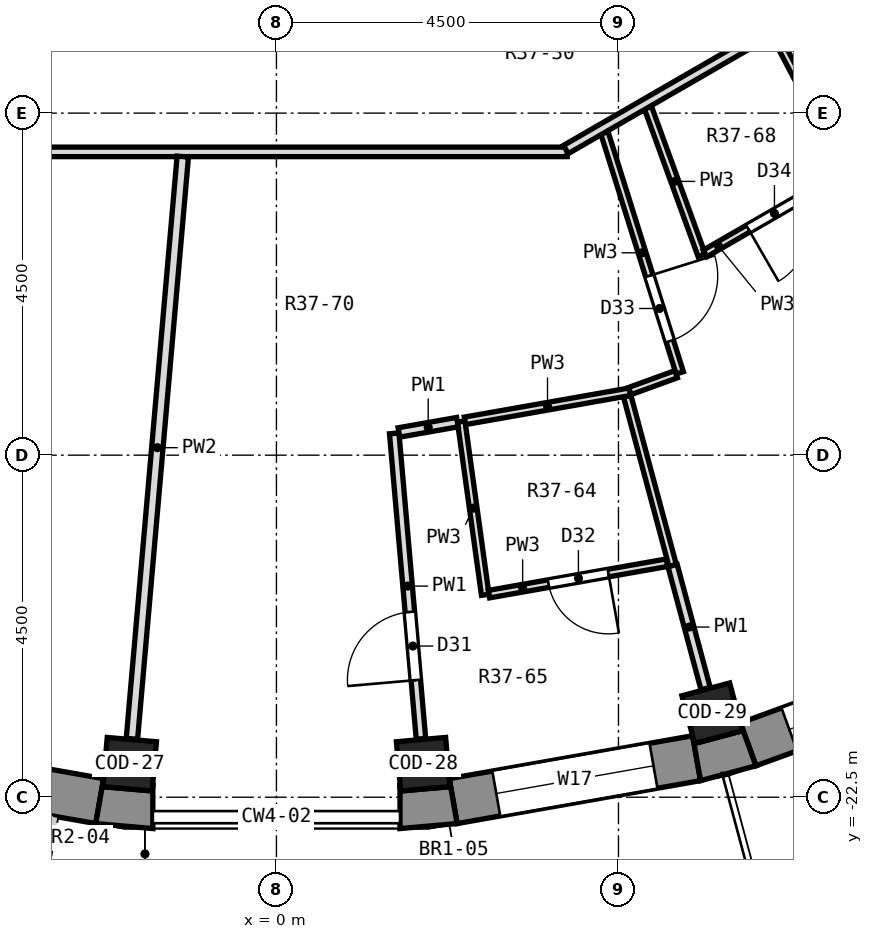
"""IFC4 building model, lengths in metres.
Left out: names, types, materials, properties, quantities, classifications, styles, units other than length and angle.
Written with IfcOpenShell. Run it as: python <this file> out.ifc"""

import sys

from ifc_helpers import new_model, si_unit, direction, frame, frame_2d, origin, origin_2d, place, context, subcontext, project, spatial, polyline, rectangle, outline, extrude, element, fill, save


model = new_model("IFC4")
c1 = context("Model", 3, precision=1e-05, world=origin(), true_north=direction((0.0, 1.0)))
c2 = subcontext(c1, "Body", "Model", "MODEL_VIEW")
j1 = project(units=[si_unit("LENGTHUNIT", "METRE"), si_unit("PLANEANGLEUNIT", "RADIAN")], contexts=[c1])
p1 = place(None, origin())
s1 = spatial("IfcSite", under=j1, at=p1, CompositionType="ELEMENT")
p2 = place(p1, origin())
s2 = spatial("IfcBuilding", under=s1, at=p2, CompositionType="ELEMENT")
p3 = place(p2, frame((0.0, 0.0, 269.3)))
s3 = spatial("IfcBuildingStorey", under=s2, at=p3, CompositionType="ELEMENT", Elevation=269.3)
for number, where, z_axis, x_axis in (
    (1, (-1.93, -22.066, 0.0), (0.0, 0.0, 1.0), (-0.087, -0.996, 0.0)),
    (2, (1.93, -22.066, 0.0), (0.0, 0.0, 1.0), (0.087, -0.996, 0.0)),
    (3, (5.733, -21.395, 0.0), (0.0, 0.0, 1.0), (0.259, -0.966, 0.0)),
):
    element("IfcColumn", number, at=place(p3, frame(where, z_axis=z_axis, x_axis=x_axis)), inside=s3, PredefinedType="COLUMN", context=c2, shape_type="SweptSolid", body=[
        extrude(rectangle(XDim=0.65, YDim=0.65, at=origin_2d()), origin(), (0.0, 0.0, 1.0), 3.3),
    ])
p4 = place(p3, frame((-5.528, -21.987, 0.0), z_axis=(0.0, 0.0, 1.0), x_axis=(0.984806225186, -0.173656842178, 0.0)))
e4 = element("IfcWall", 4, at=p4, inside=s3, PredefinedType="SOLIDWALL", context=c2, shape_type="SweptSolid", body=[
    extrude(rectangle(XDim=3.252, YDim=0.6, at=frame_2d((1.626, 0.0))), origin(), (0.0, 0.0, 1.0), 2.9),
])
p5 = place(p4, frame((0.876, 0.0, 0.0)))
e5 = element("IfcOpeningElement", 5, at=p5, cuts=e4, PredefinedType="OPENING", context=c2, shape_type="SweptSolid", body=[
    extrude(rectangle(XDim=1.5, YDim=2.4, at=frame_2d((0.75, 1.2))), frame((0.0, 0.312, 0.0), z_axis=(0.0, -1.0, 0.0), x_axis=(1.0, 0.0, 0.0)), (0.0, 0.0, 1.0), 0.624),
])
p6 = place(p3, frame((2.325, -22.551, 0.0), z_axis=(0.0, 0.0, 1.0), x_axis=(0.984806225186, 0.173656842178, 0.0)))
e6 = element("IfcWall", 6, at=p6, inside=s3, PredefinedType="SOLIDWALL", context=c2, shape_type="SweptSolid", body=[
    extrude(rectangle(XDim=3.252, YDim=0.6, at=frame_2d((1.626, 0.0))), origin(), (0.0, 0.0, 1.0), 2.9),
])
p7 = place(p6, frame((0.576, 0.0, 0.9)))
e7 = element("IfcOpeningElement", 7, at=p7, cuts=e6, PredefinedType="OPENING", context=c2, shape_type="SweptSolid", body=[
    extrude(rectangle(XDim=2.1, YDim=1.8, at=frame_2d((1.05, 0.9))), frame((0.0, 0.312, 0.0), z_axis=(0.0, -1.0, 0.0), x_axis=(1.0, 0.0, 0.0)), (0.0, 0.0, 1.0), 0.624),
])
p8 = place(p3, frame((6.206, -21.805, 0.0), z_axis=(0.0, 0.0, 1.0), x_axis=(0.939679383794, 0.342056509473, 0.0)))
e8 = element("IfcWall", 8, at=p8, inside=s3, PredefinedType="SOLIDWALL", context=c2, shape_type="SweptSolid", body=[
    extrude(rectangle(XDim=3.252, YDim=0.6, at=frame_2d((1.626, 0.0))), origin(), (0.0, 0.0, 1.0), 2.9),
])
p9 = place(p8, frame((0.576, 0.0, 0.9)))
e9 = element("IfcOpeningElement", 9, at=p9, cuts=e8, PredefinedType="OPENING", context=c2, shape_type="SweptSolid", body=[
    extrude(rectangle(XDim=2.1, YDim=1.8, at=frame_2d((1.05, 0.9))), frame((0.0, 0.312, 0.0), z_axis=(0.0, -1.0, 0.0), x_axis=(1.0, 0.0, 0.0)), (0.0, 0.0, 1.0), 0.624),
])
p10 = place(p3, origin())
e10 = element("IfcWall", 10, at=p10, inside=s3, PredefinedType="SOLIDWALL", context=c2, shape_type="SweptSolid", body=[
    extrude(outline(polyline([(-2.378, -22.847), (-1.626, -22.913), (-1.626, -22.312), (-1.635, -22.418), (-2.283, -22.361), (-2.273, -22.256), (-2.378, -22.847)])), origin(), (0.0, 0.0, 1.0), 2.9),
])
p11 = place(p3, origin())
e11 = element("IfcWall", 11, at=p11, inside=s3, PredefinedType="SOLIDWALL", context=c2, shape_type="SweptSolid", body=[
    extrude(outline(polyline([(1.626, -22.913), (2.378, -22.847), (2.273, -22.256), (2.283, -22.361), (1.635, -22.418), (1.626, -22.312), (1.626, -22.913)])), origin(), (0.0, 0.0, 1.0), 2.9),
])
p12 = place(p3, origin())
e12 = element("IfcWall", 12, at=p12, inside=s3, PredefinedType="SOLIDWALL", context=c2, shape_type="SweptSolid", body=[
    extrude(outline(polyline([(6.309, -22.087), (6.104, -21.523), (6.131, -21.625), (5.503, -21.793), (5.476, -21.691), (5.58, -22.282), (6.309, -22.087)])), origin(), (0.0, 0.0, 1.0), 2.9),
])
p13 = place(p3, origin())
e13 = element("IfcWall", 13, at=p13, inside=s3, PredefinedType="PARAPET", context=c2, shape_type="SweptSolid", body=[
    extrude(outline(polyline([(-10.675, -22.892), (-6.537, -24.398), (-2.201, -25.163), (-2.149, -24.562), (-6.382, -23.816), (-10.42, -22.346), (-10.675, -22.892)])), origin(), (0.0, 0.0, 1.0), 0.5),
])
p14 = place(p3, frame((1.55, -17.713, 0.0), z_axis=(0.0, 0.0, 1.0), x_axis=(0.087206738893, -0.996190235192, 0.0)))
e14 = element("IfcWall", 14, at=p14, inside=s3, PredefinedType="PARTITIONING", context=c2, shape_type="SweptSolid", body=[
    extrude(rectangle(XDim=4.034, YDim=0.125, at=frame_2d((2.017, 0.0))), origin(), (0.0, 0.0, 1.0), 2.9),
])
p15 = place(p14, frame((2.359, 0.0, 0.0)))
e15 = element("IfcOpeningElement", 15, at=p15, cuts=e14, PredefinedType="OPENING", context=c2, shape_type="SweptSolid", body=[
    extrude(rectangle(XDim=0.9, YDim=2.1, at=frame_2d((0.45, 1.05))), frame((0.0, 0.074, 0.0), z_axis=(0.0, -1.0, 0.0), x_axis=(1.0, 0.0, 0.0)), (0.0, 0.0, 1.0), 0.149),
])
p16 = place(p3, frame((2.431, -17.557, 0.0), z_axis=(0.0, 0.0, 1.0), x_axis=(0.137351585164, -0.990522358179, 0.0)))
e16 = element("IfcWall", 16, at=p16, inside=s3, PredefinedType="PARTITIONING", context=c2, shape_type="SweptSolid", body=[
    extrude(rectangle(XDim=2.302, YDim=0.1, at=frame_2d((1.151, 0.0))), origin(), (0.0, 0.0, 1.0), 2.9),
])
p17 = place(p3, frame((4.615, -17.222, 0.0), z_axis=(0.0, 0.0, 1.0), x_axis=(0.259222412409, -0.965817654066, 0.0)))
e17 = element("IfcWall", 17, at=p17, inside=s3, PredefinedType="PARTITIONING", context=c2, shape_type="SweptSolid", body=[
    extrude(rectangle(XDim=2.308, YDim=0.1, at=frame_2d((1.154, 0.0))), origin(), (0.0, 0.0, 1.0), 2.9),
])
p18 = place(p3, frame((5.212, -19.452, 0.0), z_axis=(0.0, 0.0, 1.0), x_axis=(0.259221341364, -0.96581794153, 0.0)))
e18 = element("IfcWall", 18, at=p18, inside=s3, PredefinedType="PARTITIONING", context=c2, shape_type="SweptSolid", body=[
    extrude(rectangle(XDim=1.677, YDim=0.125, at=frame_2d((0.838, 0.0))), origin(), (0.0, 0.0, 1.0), 2.9),
])
p19 = place(p3, frame((4.315, -13.758, 0.0), z_axis=(0.0, 0.0, 1.0), x_axis=(0.299479577404, -0.95410271078, 0.0)))
e19 = element("IfcWall", 19, at=p19, inside=s3, PredefinedType="PARTITIONING", context=c2, shape_type="SweptSolid", body=[
    extrude(rectangle(XDim=3.312, YDim=0.1, at=frame_2d((1.656, 0.0))), origin(), (0.0, 0.0, 1.0), 2.9),
])
p20 = place(p19, frame((1.974, 0.0, 0.0)))
e20 = element("IfcOpeningElement", 20, at=p20, cuts=e19, PredefinedType="OPENING", context=c2, shape_type="SweptSolid", body=[
    extrude(rectangle(XDim=0.9, YDim=2.1, at=frame_2d((0.45, 1.05))), frame((0.0, 0.062, 0.0), z_axis=(0.0, -1.0, 0.0), x_axis=(1.0, 0.0, 0.0)), (0.0, 0.0, 1.0), 0.124),
])
p21 = place(p3, frame((4.887, -13.427, 0.0), z_axis=(0.0, 0.0, 1.0), x_axis=(0.34179045994, -0.939776186916, 0.0)))
e21 = element("IfcWall", 21, at=p21, inside=s3, PredefinedType="PARTITIONING", context=c2, shape_type="SweptSolid", body=[
    extrude(rectangle(XDim=2.068, YDim=0.1, at=frame_2d((1.034, 0.0))), origin(), (0.0, 0.0, 1.0), 2.9),
])
p22 = place(p3, frame((6.559, -12.462, 0.0), z_axis=(0.0, 0.0, 1.0), x_axis=(0.465716796336, -0.884933819904, 0.0)))
e22 = element("IfcWall", 22, at=p22, inside=s3, PredefinedType="PARTITIONING", context=c2, shape_type="SweptSolid", body=[
    extrude(rectangle(XDim=2.037, YDim=0.1, at=frame_2d((1.019, 0.0))), origin(), (0.0, 0.0, 1.0), 2.9),
])
p23 = place(p3, frame((-3.691, -14.01, 0.0), z_axis=(0.0, 0.0, 1.0), x_axis=(1.0, 0.0, 0.0)))
e23 = element("IfcWall", 23, at=p23, inside=s3, PredefinedType="PARTITIONING", context=c2, shape_type="SweptSolid", body=[
    extrude(rectangle(XDim=7.517, YDim=0.125, at=frame_2d((3.759, 0.0))), origin(), (0.0, 0.0, 1.0), 2.9),
])
p24 = place(p3, frame((2.796, -19.828, 0.0), z_axis=(0.0, 0.0, 1.0), x_axis=(0.984754600233, 0.173949352742, 0.0)))
e24 = element("IfcWall", 24, at=p24, inside=s3, PredefinedType="PARTITIONING", context=c2, shape_type="SweptSolid", body=[
    extrude(rectangle(XDim=2.377, YDim=0.1, at=frame_2d((1.189, 0.0))), origin(), (0.0, 0.0, 1.0), 2.9),
])
p25 = place(p24, frame((0.795, 0.0, 0.0)))
e25 = element("IfcOpeningElement", 25, at=p25, cuts=e24, PredefinedType="OPENING", context=c2, shape_type="SweptSolid", body=[
    extrude(rectangle(XDim=0.8, YDim=2.1, at=frame_2d((0.4, 1.05))), frame((0.0, 0.062, 0.0), z_axis=(0.0, -1.0, 0.0), x_axis=(1.0, 0.0, 0.0)), (0.0, 0.0, 1.0), 0.124),
])
p26 = place(p3, frame((2.48, -17.548, 0.0), z_axis=(0.0, 0.0, 1.0), x_axis=(0.984791356236, 0.173741142745, 0.0)))
e26 = element("IfcWall", 26, at=p26, inside=s3, PredefinedType="PARTITIONING", context=c2, shape_type="SweptSolid", body=[
    extrude(rectangle(XDim=2.206, YDim=0.1, at=frame_2d((1.103, 0.0))), origin(), (0.0, 0.0, 1.0), 2.9),
])
p27 = place(p3, frame((1.612, -17.701, 0.0), z_axis=(0.0, 0.0, 1.0), x_axis=(0.984877691651, 0.173251067786, 0.0)))
e27 = element("IfcWall", 27, at=p27, inside=s3, PredefinedType="PARTITIONING", context=c2, shape_type="SweptSolid", body=[
    extrude(rectangle(XDim=0.782, YDim=0.125, at=frame_2d((0.391, 0.0))), origin(), (0.0, 0.0, 1.0), 2.9),
])
p28 = place(p3, frame((4.65, -17.156, 0.0), z_axis=(0.0, 0.0, 1.0), x_axis=(0.939771391362, 0.341803645353, 0.0)))
e28 = element("IfcWall", 28, at=p28, inside=s3, PredefinedType="PARTITIONING", context=c2, shape_type="SweptSolid", body=[
    extrude(rectangle(XDim=0.647, YDim=0.1, at=frame_2d((0.324, 0.0))), origin(), (0.0, 0.0, 1.0), 2.9),
])
p29 = place(p3, frame((5.64, -15.346, 0.0), z_axis=(0.0, 0.0, 1.0), x_axis=(0.866046731735, 0.499963057087, 0.0)))
e29 = element("IfcWall", 29, at=p29, inside=s3, PredefinedType="PARTITIONING", context=c2, shape_type="SweptSolid", body=[
    extrude(rectangle(XDim=2.108, YDim=0.1, at=frame_2d((1.054, 0.0))), origin(), (0.0, 0.0, 1.0), 2.9),
])
p30 = place(p29, frame((0.653, 0.0, 0.0)))
e30 = element("IfcOpeningElement", 30, at=p30, cuts=e29, PredefinedType="OPENING", context=c2, shape_type="SweptSolid", body=[
    extrude(rectangle(XDim=0.8, YDim=2.1, at=frame_2d((0.4, 1.05))), frame((0.0, 0.062, 0.0), z_axis=(0.0, -1.0, 0.0), x_axis=(1.0, 0.0, 0.0)), (0.0, 0.0, 1.0), 0.124),
])
p31 = place(p3, frame((3.808, -13.979, 0.0), z_axis=(0.0, 0.0, 1.0), x_axis=(0.866028642731, 0.499994389938, 0.0)))
e31 = element("IfcWall", 31, at=p31, inside=s3, PredefinedType="PARTITIONING", context=c2, shape_type="SweptSolid", body=[
    extrude(rectangle(XDim=7.383, YDim=0.125, at=frame_2d((3.691, 0.0))), origin(), (0.0, 0.0, 1.0), 2.9),
])
p32 = place(p31, frame((4.795, 0.0, 0.0)))
e32 = element("IfcOpeningElement", 32, at=p32, cuts=e31, PredefinedType="OPENING", context=c2, shape_type="SweptSolid", body=[
    extrude(rectangle(XDim=1.0, YDim=2.1, at=frame_2d((0.5, 1.05))), frame((0.0, 0.074, 0.0), z_axis=(0.0, -1.0, 0.0), x_axis=(1.0, 0.0, 0.0)), (0.0, 0.0, 1.0), 0.149),
])
p33 = place(p3, frame((-1.901, -21.732, 0.0), z_axis=(0.0, 0.0, 1.0), x_axis=(0.087062572149, 0.996202845073, 0.0)))
e33 = element("IfcWall", 33, at=p33, inside=s3, PredefinedType="PARTITIONING", context=c2, shape_type="SweptSolid", body=[
    extrude(rectangle(XDim=7.689, YDim=0.15, at=frame_2d((3.845, 0.0))), origin(), (0.0, 0.0, 1.0), 2.9),
])
p34 = place(p7, origin())
e34 = element("IfcWindow", 34, at=p34, inside=s3, PartitioningType="SINGLE_PANEL", PredefinedType="WINDOW", context=c2, shape_type="SweptSolid", body=[
    extrude(rectangle(XDim=2.1, YDim=1.8, at=frame_2d((1.05, 0.9))), frame((0.0, 0.18, 0.0), z_axis=(0.0, -1.0, 0.0), x_axis=(1.0, 0.0, 0.0)), (0.0, 0.0, 1.0), 0.06),
])
fill(e7, e34)
p35 = place(p9, origin())
e35 = element("IfcWindow", 35, at=p35, inside=s3, PartitioningType="SINGLE_PANEL", PredefinedType="WINDOW", context=c2, shape_type="SweptSolid", body=[
    extrude(rectangle(XDim=2.1, YDim=1.8, at=frame_2d((1.05, 0.9))), frame((0.0, 0.18, 0.0), z_axis=(0.0, -1.0, 0.0), x_axis=(1.0, 0.0, 0.0)), (0.0, 0.0, 1.0), 0.06),
])
fill(e9, e35)
p36 = place(p15, frame((0.9, 0.0, 0.0), z_axis=(0.0, 0.0, 1.0), x_axis=(-1.0, 0.0, 0.0)))
e36 = element("IfcDoor", 36, at=p36, inside=s3, OperationType="SINGLE_SWING_LEFT", PredefinedType="DOOR", context=c2, shape_type="SweptSolid", body=[
    extrude(rectangle(XDim=0.9, YDim=2.1, at=frame_2d((0.45, 1.05))), frame((0.0, 0.025, 0.0), z_axis=(0.0, -1.0, 0.0), x_axis=(1.0, 0.0, 0.0)), (0.0, 0.0, 1.0), 0.05),
])
fill(e15, e36)
p37 = place(p25, frame((0.8, 0.0, 0.0), z_axis=(0.0, 0.0, 1.0), x_axis=(-1.0, 0.0, 0.0)))
e37 = element("IfcDoor", 37, at=p37, inside=s3, OperationType="SINGLE_SWING_LEFT", PredefinedType="DOOR", context=c2, shape_type="SweptSolid", body=[
    extrude(rectangle(XDim=0.8, YDim=2.1, at=frame_2d((0.4, 1.05))), frame((0.0, 0.025, 0.0), z_axis=(0.0, -1.0, 0.0), x_axis=(1.0, 0.0, 0.0)), (0.0, 0.0, 1.0), 0.05),
])
fill(e25, e37)
p38 = place(p20, origin())
e38 = element("IfcDoor", 38, at=p38, inside=s3, OperationType="SINGLE_SWING_LEFT", PredefinedType="DOOR", context=c2, shape_type="SweptSolid", body=[
    extrude(rectangle(XDim=0.9, YDim=2.1, at=frame_2d((0.45, 1.05))), frame((0.0, 0.025, 0.0), z_axis=(0.0, -1.0, 0.0), x_axis=(1.0, 0.0, 0.0)), (0.0, 0.0, 1.0), 0.05),
])
fill(e20, e38)
p39 = place(p30, frame((0.8, 0.0, 0.0), z_axis=(0.0, 0.0, 1.0), x_axis=(-1.0, 0.0, 0.0)))
e39 = element("IfcDoor", 39, at=p39, inside=s3, OperationType="SINGLE_SWING_RIGHT", PredefinedType="DOOR", context=c2, shape_type="SweptSolid", body=[
    extrude(rectangle(XDim=0.8, YDim=2.1, at=frame_2d((0.4, 1.05))), frame((0.0, 0.025, 0.0), z_axis=(0.0, -1.0, 0.0), x_axis=(1.0, 0.0, 0.0)), (0.0, 0.0, 1.0), 0.05),
])
fill(e30, e39)
save(model, sys.argv[1])
